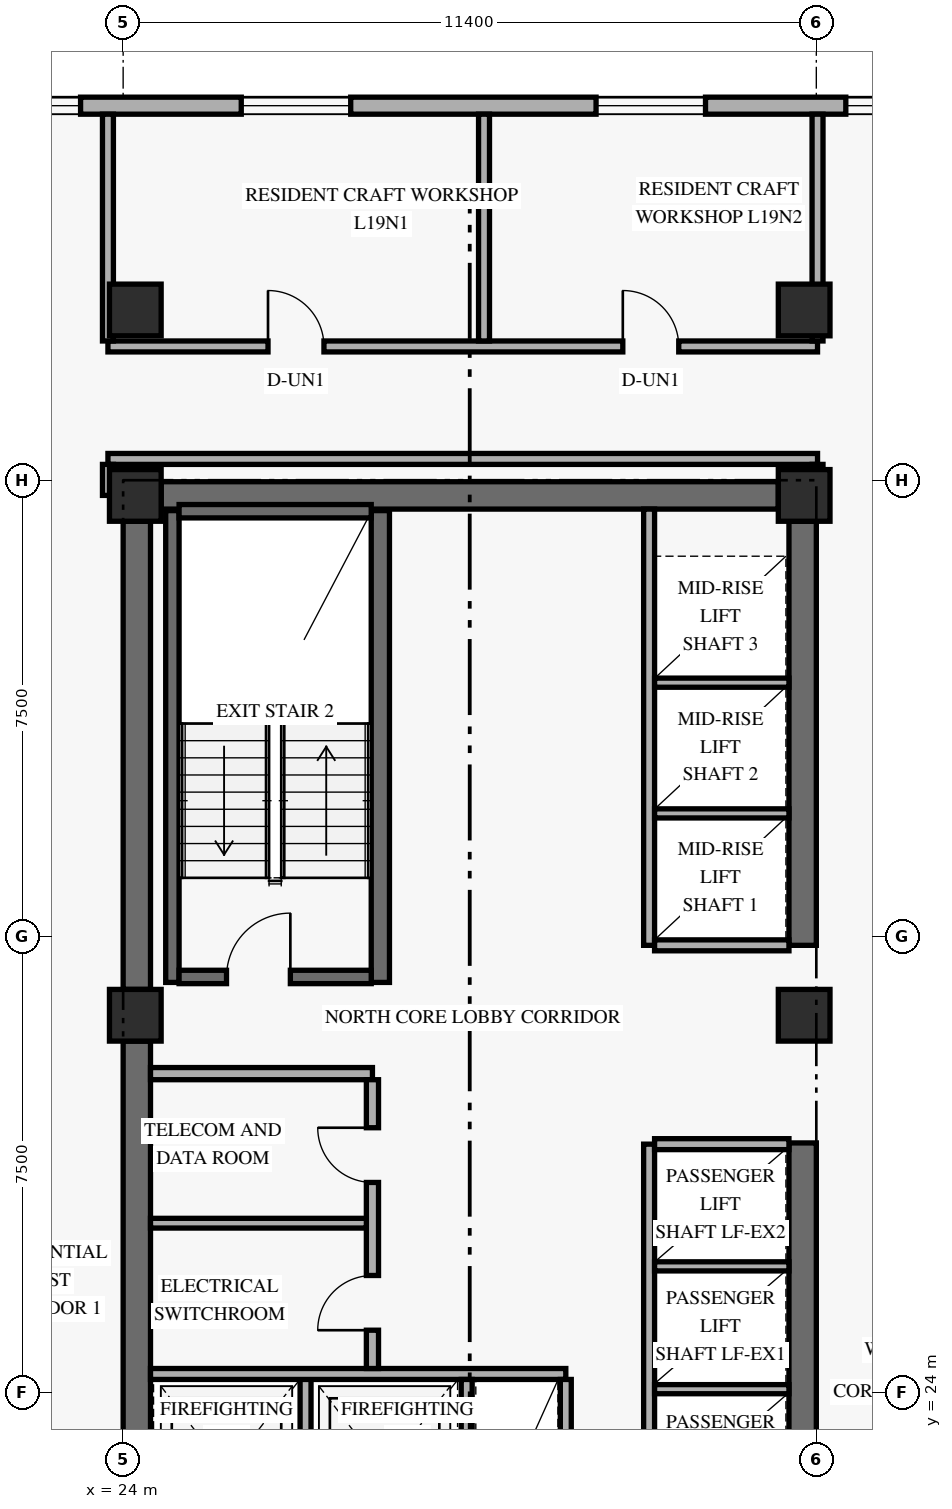
"""IFC4 building model, lengths in metres.
Left out: names, types, materials, properties, quantities, classifications, styles, units other than length and angle.
Written with IfcOpenShell. Run it as: python <this file> out.ifc"""

import sys

from ifc_helpers import new_model, si_unit, direction, frame, frame_2d, origin, origin_2d, place, context, subcontext, project, spatial, rectangle, extrude, element, fill, save


model = new_model("IFC4")
c1 = context("Model", 3, precision=1e-05, world=origin(), true_north=direction((0.0, 1.0)))
c2 = subcontext(c1, "Body", "Model", "MODEL_VIEW")
j1 = project(units=[si_unit("LENGTHUNIT", "METRE"), si_unit("PLANEANGLEUNIT", "RADIAN")], contexts=[c1])
p1 = place(None, origin())
s1 = spatial("IfcSite", under=j1, at=p1, CompositionType="ELEMENT")
p2 = place(p1, origin())
s2 = spatial("IfcBuilding", under=s1, at=p2, CompositionType="ELEMENT")
p3 = place(p2, frame((0.0, 0.0, 76.8)))
s3 = spatial("IfcBuildingStorey", under=s2, at=p3, CompositionType="ELEMENT", Elevation=76.8)
p4 = place(p3, frame((24.225, 17.975, 0.0), z_axis=(0.0, 0.0, 1.0), x_axis=(0.0, 1.0, 0.0)))
e1 = element("IfcWall", 1, at=p4, inside=s3, PredefinedType="SHEAR", context=c2, shape_type="SweptSolid", body=[
    extrude(rectangle(XDim=11.8, YDim=0.45, at=frame_2d((5.9, 0.0))), origin(), (0.0, 0.0, 1.0), 2.749),
])
p5 = place(p3, frame((24.225, 30.625, 0.0), z_axis=(0.0, 0.0, 1.0), x_axis=(0.0, 1.0, 0.0)))
e2 = element("IfcWall", 2, at=p5, inside=s3, PredefinedType="SHEAR", context=c2, shape_type="SweptSolid", body=[
    extrude(rectangle(XDim=7.7, YDim=0.45, at=frame_2d((3.85, 0.0))), origin(), (0.0, 0.0, 1.0), 2.749),
])
p6 = place(p3, frame((35.175, 17.975, 0.0), z_axis=(0.0, 0.0, 1.0), x_axis=(0.0, 1.0, 0.0)))
e3 = element("IfcWall", 3, at=p6, inside=s3, PredefinedType="SHEAR", context=c2, shape_type="SweptSolid", body=[
    extrude(rectangle(XDim=10.125, YDim=0.45, at=frame_2d((5.062, 0.0))), origin(), (0.0, 0.0, 1.0), 2.749),
])
p7 = place(p3, frame((35.175, 31.35, 0.0), z_axis=(0.0, 0.0, 1.0), x_axis=(0.0, 1.0, 0.0)))
e4 = element("IfcWall", 4, at=p7, inside=s3, PredefinedType="SHEAR", context=c2, shape_type="SweptSolid", body=[
    extrude(rectangle(XDim=6.975, YDim=0.45, at=frame_2d((3.487, 0.0))), origin(), (0.0, 0.0, 1.0), 2.749),
])
p8 = place(p3, frame((24.625, 38.75, 0.0), z_axis=(0.0, 0.0, 1.0), x_axis=(1.0, 0.0, 0.0)))
e5 = element("IfcWall", 5, at=p8, inside=s3, PredefinedType="SHEAR", context=c2, shape_type="SweptSolid", body=[
    extrude(rectangle(XDim=10.15, YDim=0.45, at=frame_2d((5.075, 0.0))), origin(), (0.0, 0.0, 1.0), 3.36),
])
p9 = place(p3, frame((24.81, 30.74, 0.0), z_axis=(0.0, 0.0, 1.0), x_axis=(0.0, 1.0, 0.0)))
e6 = element("IfcWall", 6, at=p9, inside=s3, PredefinedType="SHEAR", context=c2, shape_type="SweptSolid", body=[
    extrude(rectangle(XDim=7.76, YDim=0.22, at=frame_2d((3.88, 0.0))), origin(), (0.0, 0.0, 1.0), 3.36),
])
p10 = place(p3, frame((28.23, 30.74, 0.0), z_axis=(0.0, 0.0, 1.0), x_axis=(0.0, 1.0, 0.0)))
e7 = element("IfcWall", 7, at=p10, inside=s3, PredefinedType="SHEAR", context=c2, shape_type="SweptSolid", body=[
    extrude(rectangle(XDim=7.76, YDim=0.3, at=frame_2d((3.88, 0.0))), origin(), (0.0, 0.0, 1.0), 3.36),
])
p11 = place(p3, frame((24.92, 30.83, 0.0), z_axis=(0.0, 0.0, 1.0), x_axis=(1.0, 0.0, 0.0)))
e8 = element("IfcWall", 8, at=p11, inside=s3, PredefinedType="SHEAR", context=c2, shape_type="SweptSolid", body=[
    extrude(rectangle(XDim=3.16, YDim=0.22, at=frame_2d((1.58, 0.0))), origin(), (0.0, 0.0, 1.0), 3.36),
])
p12 = place(p11, frame((0.78, 0.0, 0.0)))
e9 = element("IfcOpeningElement", 9, at=p12, cuts=e8, PredefinedType="OPENING", context=c2, shape_type="SweptSolid", body=[
    extrude(rectangle(XDim=1.05, YDim=2.15, at=frame_2d((0.525, 1.075))), frame((0.0, 0.12, 0.0), z_axis=(0.0, -1.0, 0.0), x_axis=(1.0, 0.0, 0.0)), (0.0, 0.0, 1.0), 0.24),
])
p13 = place(p3, frame((24.92, 38.49, 0.0), z_axis=(0.0, 0.0, 1.0), x_axis=(1.0, 0.0, 0.0)))
e10 = element("IfcWall", 10, at=p13, inside=s3, PredefinedType="SHEAR", context=c2, shape_type="SweptSolid", body=[
    extrude(rectangle(XDim=3.16, YDim=0.22, at=frame_2d((1.58, 0.0))), origin(), (0.0, 0.0, 1.0), 3.36),
])
for number, where, z_axis, x_axis in (
    (11, (24.2, 30.2, 0.0), (0.0, 0.0, 1.0), (1.0, 0.0, 0.0)),
    (12, (24.2, 38.75, 0.0), (0.0, 0.0, 1.0), (1.0, 0.0, 0.0)),
    (13, (24.2, 41.8, 0.0), (0.0, 0.0, 1.0), (1.0, 0.0, 0.0)),
    (14, (35.2, 30.2, 0.0), (0.0, 0.0, 1.0), (1.0, 0.0, 0.0)),
    (15, (35.2, 38.75, 0.0), (0.0, 0.0, 1.0), (1.0, 0.0, 0.0)),
    (16, (35.2, 41.8, 0.0), (0.0, 0.0, 1.0), (1.0, 0.0, 0.0)),
):
    element("IfcColumn", number, at=place(p3, frame(where, z_axis=z_axis, x_axis=x_axis)), inside=s3, PredefinedType="COLUMN", context=c2, shape_type="SweptSolid", body=[
        extrude(rectangle(XDim=0.85, YDim=0.85, at=origin_2d()), origin(), (0.0, 0.0, 1.0), 3.6),
    ])
p14 = place(p3, frame((49.98, 45.16, 0.0), z_axis=(0.0, 0.0, 1.0), x_axis=(-1.0, 0.0, 0.0)))
e17 = element("IfcWall", 17, at=p14, inside=s3, PredefinedType="SOLIDWALL", context=c2, shape_type="SweptSolid", body=[
    extrude(rectangle(XDim=36.56, YDim=0.28, at=frame_2d((18.28, 0.0))), origin(), (0.0, 0.0, 1.0), 3.36),
])
p15 = place(p14, frame((31.545, 0.0, 0.85)))
e18 = element("IfcOpeningElement", 18, at=p15, cuts=e17, PredefinedType="OPENING", context=c2, shape_type="SweptSolid", body=[
    extrude(rectangle(XDim=1.8, YDim=1.6, at=frame_2d((0.9, 0.8))), frame((0.0, 0.15, 0.0), z_axis=(0.0, -1.0, 0.0), x_axis=(1.0, 0.0, 0.0)), (0.0, 0.0, 1.0), 0.3),
])
p16 = place(p14, frame((26.68, 0.0, 0.85)))
e19 = element("IfcOpeningElement", 19, at=p16, cuts=e17, PredefinedType="OPENING", context=c2, shape_type="SweptSolid", body=[
    extrude(rectangle(XDim=1.2, YDim=1.5, at=frame_2d((0.6, 0.75))), frame((0.0, 0.15, 0.0), z_axis=(0.0, -1.0, 0.0), x_axis=(1.0, 0.0, 0.0)), (0.0, 0.0, 1.0), 0.3),
])
p17 = place(p14, frame((22.237, 0.0, 0.85)))
e20 = element("IfcOpeningElement", 20, at=p17, cuts=e17, PredefinedType="OPENING", context=c2, shape_type="SweptSolid", body=[
    extrude(rectangle(XDim=1.8, YDim=1.6, at=frame_2d((0.9, 0.8))), frame((0.0, 0.15, 0.0), z_axis=(0.0, -1.0, 0.0), x_axis=(1.0, 0.0, 0.0)), (0.0, 0.0, 1.0), 0.3),
])
p18 = place(p14, frame((16.402, 0.0, 0.85)))
e21 = element("IfcOpeningElement", 21, at=p18, cuts=e17, PredefinedType="OPENING", context=c2, shape_type="SweptSolid", body=[
    extrude(rectangle(XDim=1.8, YDim=1.6, at=frame_2d((0.9, 0.8))), frame((0.0, 0.15, 0.0), z_axis=(0.0, -1.0, 0.0), x_axis=(1.0, 0.0, 0.0)), (0.0, 0.0, 1.0), 0.3),
])
p19 = place(p14, frame((12.895, 0.0, 0.85)))
e22 = element("IfcOpeningElement", 22, at=p19, cuts=e17, PredefinedType="OPENING", context=c2, shape_type="SweptSolid", body=[
    extrude(rectangle(XDim=1.2, YDim=1.5, at=frame_2d((0.6, 0.75))), frame((0.0, 0.15, 0.0), z_axis=(0.0, -1.0, 0.0), x_axis=(1.0, 0.0, 0.0)), (0.0, 0.0, 1.0), 0.3),
])
p20 = place(p14, frame((5.315, 0.0, 0.85)))
e23 = element("IfcOpeningElement", 23, at=p20, cuts=e17, PredefinedType="OPENING", context=c2, shape_type="SweptSolid", body=[
    extrude(rectangle(XDim=1.8, YDim=1.6, at=frame_2d((0.9, 0.8))), frame((0.0, 0.15, 0.0), z_axis=(0.0, -1.0, 0.0), x_axis=(1.0, 0.0, 0.0)), (0.0, 0.0, 1.0), 0.3),
])
p21 = place(p3, frame((27.0, 21.19, 0.0), z_axis=(0.0, 0.0, 1.0), x_axis=(0.0, 1.0, 0.0)))
e24 = element("IfcWall", 24, at=p21, inside=s3, PredefinedType="STANDARD", context=c2, shape_type="SweptSolid", body=[
    extrude(rectangle(XDim=3.11, YDim=0.18, at=frame_2d((1.555, 0.0))), origin(), (0.0, 0.0, 1.0), 3.36),
])
p22 = place(p3, frame((24.45, 24.3, 0.0), z_axis=(0.0, 0.0, 1.0), x_axis=(1.0, 0.0, 0.0)))
e25 = element("IfcWall", 25, at=p22, inside=s3, PredefinedType="STANDARD", context=c2, shape_type="SweptSolid", body=[
    extrude(rectangle(XDim=6.83, YDim=0.18, at=frame_2d((3.415, 0.0))), origin(), (0.0, 0.0, 1.0), 3.36),
])
for number, where, z_axis, x_axis in (
    (26, (29.65, 21.19, 0.0), (0.0, 0.0, 1.0), (0.0, 1.0, 0.0)),
    (27, (31.28, 21.19, 0.0), (0.0, 0.0, 1.0), (0.0, 1.0, 0.0)),
):
    element("IfcWall", number, at=place(p3, frame(where, z_axis=z_axis, x_axis=x_axis)), inside=s3, PredefinedType="STANDARD", context=c2, shape_type="SweptSolid", body=[
        extrude(rectangle(XDim=3.02, YDim=0.18, at=frame_2d((1.51, 0.0))), origin(), (0.0, 0.0, 1.0), 3.36),
    ])
p23 = place(p3, frame((24.45, 29.24, 0.0), z_axis=(0.0, 0.0, 1.0), x_axis=(1.0, 0.0, 0.0)))
e28 = element("IfcWall", 28, at=p23, inside=s3, PredefinedType="STANDARD", context=c2, shape_type="SweptSolid", body=[
    extrude(rectangle(XDim=3.65, YDim=0.2, at=frame_2d((1.825, 0.0))), origin(), (0.0, 0.0, 1.0), 3.36),
])
p24 = place(p3, frame((28.1, 24.39, 0.0), z_axis=(0.0, 0.0, 1.0), x_axis=(0.0, 1.0, 0.0)))
e29 = element("IfcWall", 29, at=p24, inside=s3, PredefinedType="STANDARD", context=c2, shape_type="SweptSolid", body=[
    extrude(rectangle(XDim=4.75, YDim=0.2, at=frame_2d((2.375, 0.0))), origin(), (0.0, 0.0, 1.0), 3.36),
])
p25 = place(p24, frame((0.63, 0.0, 0.0)))
e30 = element("IfcOpeningElement", 30, at=p25, cuts=e29, PredefinedType="OPENING", context=c2, shape_type="SweptSolid", body=[
    extrude(rectangle(XDim=0.9, YDim=2.1, at=frame_2d((0.45, 1.05))), frame((0.0, 0.11, 0.0), z_axis=(0.0, -1.0, 0.0), x_axis=(1.0, 0.0, 0.0)), (0.0, 0.0, 1.0), 0.22),
])
p26 = place(p24, frame((3.06, 0.0, 0.0)))
e31 = element("IfcOpeningElement", 31, at=p26, cuts=e29, PredefinedType="OPENING", context=c2, shape_type="SweptSolid", body=[
    extrude(rectangle(XDim=0.9, YDim=2.1, at=frame_2d((0.45, 1.05))), frame((0.0, 0.11, 0.0), z_axis=(0.0, -1.0, 0.0), x_axis=(1.0, 0.0, 0.0)), (0.0, 0.0, 1.0), 0.22),
])
p27 = place(p3, frame((24.45, 26.78, 0.0), z_axis=(0.0, 0.0, 1.0), x_axis=(1.0, 0.0, 0.0)))
e32 = element("IfcWall", 32, at=p27, inside=s3, PredefinedType="PARTITIONING", context=c2, shape_type="SweptSolid", body=[
    extrude(rectangle(XDim=3.55, YDim=0.16, at=frame_2d((1.775, 0.0))), origin(), (0.0, 0.0, 1.0), 3.36),
])
p28 = place(p3, frame((32.65, 18.02, 0.0), z_axis=(0.0, 0.0, 1.0), x_axis=(0.0, 1.0, 0.0)))
e33 = element("IfcWall", 33, at=p28, inside=s3, PredefinedType="STANDARD", context=c2, shape_type="SweptSolid", body=[
    extrude(rectangle(XDim=10.06, YDim=0.18, at=frame_2d((5.03, 0.0))), origin(), (0.0, 0.0, 1.0), 3.36),
])
p29 = place(p3, frame((32.74, 28.08, 0.0), z_axis=(0.0, 0.0, 1.0), x_axis=(1.0, 0.0, 0.0)))
e34 = element("IfcWall", 34, at=p29, inside=s3, PredefinedType="STANDARD", context=c2, shape_type="SweptSolid", body=[
    extrude(rectangle(XDim=2.21, YDim=0.18, at=frame_2d((1.105, 0.0))), origin(), (0.0, 0.0, 1.0), 3.36),
])
for number, where, z_axis, x_axis in (
    (35, (32.74, 24.05, 0.0), (0.0, 0.0, 1.0), (1.0, 0.0, 0.0)),
    (36, (32.74, 26.07, 0.0), (0.0, 0.0, 1.0), (1.0, 0.0, 0.0)),
):
    element("IfcWall", number, at=place(p3, frame(where, z_axis=z_axis, x_axis=x_axis)), inside=s3, PredefinedType="STANDARD", context=c2, shape_type="SweptSolid", body=[
        extrude(rectangle(XDim=2.21, YDim=0.15, at=frame_2d((1.105, 0.0))), origin(), (0.0, 0.0, 1.0), 3.36),
    ])
p30 = place(p3, frame((32.65, 31.35, 0.0), z_axis=(0.0, 0.0, 1.0), x_axis=(0.0, 1.0, 0.0)))
e37 = element("IfcWall", 37, at=p30, inside=s3, PredefinedType="STANDARD", context=c2, shape_type="SweptSolid", body=[
    extrude(rectangle(XDim=7.175, YDim=0.18, at=frame_2d((3.587, 0.0))), origin(), (0.0, 0.0, 1.0), 3.36),
])
p31 = place(p3, frame((32.74, 31.35, 0.0), z_axis=(0.0, 0.0, 1.0), x_axis=(1.0, 0.0, 0.0)))
e38 = element("IfcWall", 38, at=p31, inside=s3, PredefinedType="STANDARD", context=c2, shape_type="SweptSolid", body=[
    extrude(rectangle(XDim=2.21, YDim=0.18, at=frame_2d((1.105, 0.0))), origin(), (0.0, 0.0, 1.0), 3.36),
])
for number, where, z_axis, x_axis in (
    (39, (32.74, 33.52, 0.0), (0.0, 0.0, 1.0), (1.0, 0.0, 0.0)),
    (40, (32.74, 35.67, 0.0), (0.0, 0.0, 1.0), (1.0, 0.0, 0.0)),
):
    element("IfcWall", number, at=place(p3, frame(where, z_axis=z_axis, x_axis=x_axis)), inside=s3, PredefinedType="STANDARD", context=c2, shape_type="SweptSolid", body=[
        extrude(rectangle(XDim=2.21, YDim=0.15, at=frame_2d((1.105, 0.0))), origin(), (0.0, 0.0, 1.0), 3.36),
    ])
p32 = place(p3, frame((23.75, 41.2, 0.0), z_axis=(0.0, 0.0, 1.0), x_axis=(1.0, 0.0, 0.0)))
e41 = element("IfcWall", 41, at=p32, inside=s3, PredefinedType="STANDARD", context=c2, shape_type="SweptSolid", body=[
    extrude(rectangle(XDim=11.67, YDim=0.18, at=frame_2d((5.835, 0.0))), origin(), (0.0, 0.0, 1.0), 2.731),
])
p33 = place(p32, frame((2.633, 0.0, 0.0)))
e42 = element("IfcOpeningElement", 42, at=p33, cuts=e41, PredefinedType="OPENING", context=c2, shape_type="SweptSolid", body=[
    extrude(rectangle(XDim=0.92, YDim=2.15, at=frame_2d((0.46, 1.075))), frame((0.0, 0.1, 0.0), z_axis=(0.0, -1.0, 0.0), x_axis=(1.0, 0.0, 0.0)), (0.0, 0.0, 1.0), 0.2),
])
p34 = place(p32, frame((8.468, 0.0, 0.0)))
e43 = element("IfcOpeningElement", 43, at=p34, cuts=e41, PredefinedType="OPENING", context=c2, shape_type="SweptSolid", body=[
    extrude(rectangle(XDim=0.92, YDim=2.15, at=frame_2d((0.46, 1.075))), frame((0.0, 0.1, 0.0), z_axis=(0.0, -1.0, 0.0), x_axis=(1.0, 0.0, 0.0)), (0.0, 0.0, 1.0), 0.2),
])
p35 = place(p3, frame((23.75, 39.35, 0.0), z_axis=(0.0, 0.0, 1.0), x_axis=(1.0, 0.0, 0.0)))
e44 = element("IfcWall", 44, at=p35, inside=s3, PredefinedType="STANDARD", context=c2, shape_type="SweptSolid", body=[
    extrude(rectangle(XDim=11.67, YDim=0.18, at=frame_2d((5.835, 0.0))), origin(), (0.0, 0.0, 1.0), 2.731),
])
p36 = place(p3, frame((35.42, 38.75, 0.0), z_axis=(0.0, 0.0, 1.0), x_axis=(0.0, 1.0, 0.0)))
e45 = element("IfcWall", 45, at=p36, inside=s3, PredefinedType="STANDARD", context=c2, shape_type="SweptSolid", body=[
    extrude(rectangle(XDim=0.51, YDim=0.18, at=frame_2d((0.255, 0.0))), origin(), (0.0, 0.0, 1.0), 2.731),
])
p37 = place(p3, frame((35.42, 41.29, 0.0), z_axis=(0.0, 0.0, 1.0), x_axis=(0.0, 1.0, 0.0)))
e46 = element("IfcWall", 46, at=p37, inside=s3, PredefinedType="PARTITIONING", context=c2, shape_type="SweptSolid", body=[
    extrude(rectangle(XDim=3.73, YDim=0.18, at=frame_2d((1.865, 0.0))), origin(), (0.0, 0.0, 1.0), 2.731),
])
p38 = place(p3, frame((23.75, 38.75, 0.0), z_axis=(0.0, 0.0, 1.0), x_axis=(0.0, 1.0, 0.0)))
e47 = element("IfcWall", 47, at=p38, inside=s3, PredefinedType="STANDARD", context=c2, shape_type="SweptSolid", body=[
    extrude(rectangle(XDim=0.51, YDim=0.18, at=frame_2d((0.255, 0.0))), origin(), (0.0, 0.0, 1.0), 2.731),
])
for number, where, z_axis, x_axis in (
    (48, (23.75, 41.29, 0.0), (0.0, 0.0, 1.0), (0.0, 1.0, 0.0)),
    (49, (29.935, 41.29, 0.0), (0.0, 0.0, 1.0), (0.0, 1.0, 0.0)),
):
    element("IfcWall", number, at=place(p3, frame(where, z_axis=z_axis, x_axis=x_axis)), inside=s3, PredefinedType="PARTITIONING", context=c2, shape_type="SweptSolid", body=[
        extrude(rectangle(XDim=3.73, YDim=0.18, at=frame_2d((1.865, 0.0))), origin(), (0.0, 0.0, 1.0), 2.809),
    ])
p39 = place(p16, origin())
e50 = element("IfcWindow", 50, at=p39, inside=s3, PartitioningType="SINGLE_PANEL", PredefinedType="WINDOW", context=c2, shape_type="SweptSolid", body=[
    extrude(rectangle(XDim=1.2, YDim=1.5, at=frame_2d((0.6, 0.75))), frame((0.0, 0.03, 0.0), z_axis=(0.0, -1.0, 0.0), x_axis=(1.0, 0.0, 0.0)), (0.0, 0.0, 1.0), 0.06),
])
fill(e19, e50)
p40 = place(p17, origin())
e51 = element("IfcWindow", 51, at=p40, inside=s3, PartitioningType="SINGLE_PANEL", PredefinedType="WINDOW", context=c2, shape_type="SweptSolid", body=[
    extrude(rectangle(XDim=1.8, YDim=1.6, at=frame_2d((0.9, 0.8))), frame((0.0, 0.03, 0.0), z_axis=(0.0, -1.0, 0.0), x_axis=(1.0, 0.0, 0.0)), (0.0, 0.0, 1.0), 0.06),
])
fill(e20, e51)
p41 = place(p18, origin())
e52 = element("IfcWindow", 52, at=p41, inside=s3, PartitioningType="SINGLE_PANEL", PredefinedType="WINDOW", context=c2, shape_type="SweptSolid", body=[
    extrude(rectangle(XDim=1.8, YDim=1.6, at=frame_2d((0.9, 0.8))), frame((0.0, 0.03, 0.0), z_axis=(0.0, -1.0, 0.0), x_axis=(1.0, 0.0, 0.0)), (0.0, 0.0, 1.0), 0.06),
])
fill(e21, e52)
p42 = place(p19, origin())
e53 = element("IfcWindow", 53, at=p42, inside=s3, PartitioningType="SINGLE_PANEL", PredefinedType="WINDOW", context=c2, shape_type="SweptSolid", body=[
    extrude(rectangle(XDim=1.2, YDim=1.5, at=frame_2d((0.6, 0.75))), frame((0.0, 0.03, 0.0), z_axis=(0.0, -1.0, 0.0), x_axis=(1.0, 0.0, 0.0)), (0.0, 0.0, 1.0), 0.06),
])
fill(e22, e53)
p43 = place(p12, origin())
e54 = element("IfcDoor", 54, at=p43, inside=s3, OperationType="SINGLE_SWING_RIGHT", PredefinedType="DOOR", context=c2, shape_type="SweptSolid", body=[
    extrude(rectangle(XDim=1.05, YDim=2.15, at=frame_2d((0.525, 1.075))), frame((0.0, 0.025, 0.0), z_axis=(0.0, -1.0, 0.0), x_axis=(1.0, 0.0, 0.0)), (0.0, 0.0, 1.0), 0.05),
])
fill(e9, e54)
p44 = place(p25, origin())
e55 = element("IfcDoor", 55, at=p44, inside=s3, OperationType="SINGLE_SWING_LEFT", PredefinedType="DOOR", context=c2, shape_type="SweptSolid", body=[
    extrude(rectangle(XDim=0.9, YDim=2.1, at=frame_2d((0.45, 1.05))), frame((0.0, 0.025, 0.0), z_axis=(0.0, -1.0, 0.0), x_axis=(1.0, 0.0, 0.0)), (0.0, 0.0, 1.0), 0.05),
])
fill(e30, e55)
p45 = place(p26, origin())
e56 = element("IfcDoor", 56, at=p45, inside=s3, OperationType="SINGLE_SWING_RIGHT", PredefinedType="DOOR", context=c2, shape_type="SweptSolid", body=[
    extrude(rectangle(XDim=0.9, YDim=2.1, at=frame_2d((0.45, 1.05))), frame((0.0, 0.025, 0.0), z_axis=(0.0, -1.0, 0.0), x_axis=(1.0, 0.0, 0.0)), (0.0, 0.0, 1.0), 0.05),
])
fill(e31, e56)
p46 = place(p33, origin())
e57 = element("IfcDoor", 57, at=p46, inside=s3, OperationType="SINGLE_SWING_LEFT", PredefinedType="DOOR", context=c2, shape_type="SweptSolid", body=[
    extrude(rectangle(XDim=0.92, YDim=2.15, at=frame_2d((0.46, 1.075))), frame((0.0, 0.025, 0.0), z_axis=(0.0, -1.0, 0.0), x_axis=(1.0, 0.0, 0.0)), (0.0, 0.0, 1.0), 0.05),
])
fill(e42, e57)
p47 = place(p34, origin())
e58 = element("IfcDoor", 58, at=p47, inside=s3, OperationType="SINGLE_SWING_LEFT", PredefinedType="DOOR", context=c2, shape_type="SweptSolid", body=[
    extrude(rectangle(XDim=0.92, YDim=2.15, at=frame_2d((0.46, 1.075))), frame((0.0, 0.025, 0.0), z_axis=(0.0, -1.0, 0.0), x_axis=(1.0, 0.0, 0.0)), (0.0, 0.0, 1.0), 0.05),
])
fill(e43, e58)
save(model, sys.argv[1])
